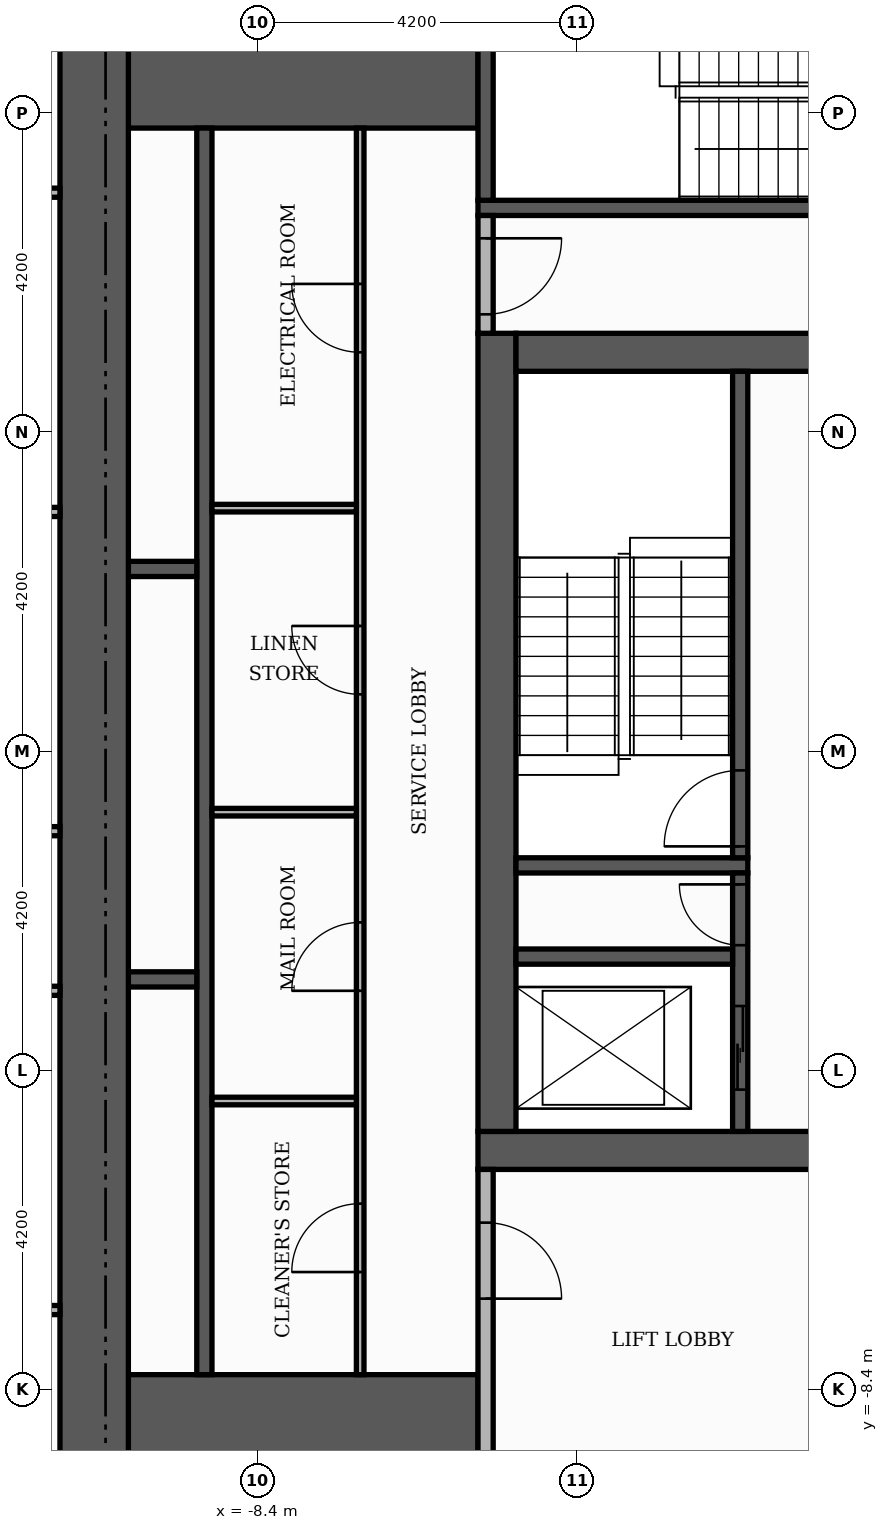
"""IFC4 building model, lengths in metres.
Left out: names, types, materials, properties, quantities, classifications, styles, units other than length and angle.
Written with IfcOpenShell. Run it as: python <this file> out.ifc"""

import sys

from ifc_helpers import new_model, si_unit, direction, frame, frame_2d, origin, place, context, subcontext, project, spatial, rectangle, extrude, element, fill, save


model = new_model("IFC4")
c1 = context("Model", 3, precision=1e-05, world=origin(), true_north=direction((0.0, 1.0)))
c2 = subcontext(c1, "Body", "Model", "MODEL_VIEW")
j1 = project(units=[si_unit("LENGTHUNIT", "METRE"), si_unit("PLANEANGLEUNIT", "RADIAN")], contexts=[c1])
p1 = place(None, origin())
s1 = spatial("IfcSite", under=j1, at=p1, CompositionType="ELEMENT")
p2 = place(p1, origin())
s2 = spatial("IfcBuilding", under=s1, at=p2, CompositionType="ELEMENT")
p3 = place(p2, frame((0.0, 0.0, 161.1)))
s3 = spatial("IfcBuildingStorey", under=s2, at=p3, CompositionType="ELEMENT", Elevation=161.1)
p4 = place(p3, frame((-5.5, -5.25, 0.0), z_axis=(0.0, 0.0, 1.0), x_axis=(1.0, 0.0, 0.0)))
e1 = element("IfcWall", 1, at=p4, inside=s3, PredefinedType="SHEAR", context=c2, shape_type="SweptSolid", body=[
    extrude(rectangle(XDim=11.0, YDim=0.5, at=frame_2d((5.5, 0.0))), origin(), (0.0, 0.0, 1.0), 3.48),
])
p5 = place(p4, frame((4.9, 0.0, 0.0)))
e2 = element("IfcOpeningElement", 2, at=p5, cuts=e1, PredefinedType="OPENING", context=c2, shape_type="SweptSolid", body=[
    extrude(rectangle(XDim=1.2, YDim=2.1, at=frame_2d((0.6, 1.05))), frame((0.0, 0.26, 0.0), z_axis=(0.0, -1.0, 0.0), x_axis=(1.0, 0.0, 0.0)), (0.0, 0.0, 1.0), 0.52),
])
p6 = place(p3, frame((-5.25, -5.0, 0.0), z_axis=(0.0, 0.0, 1.0), x_axis=(0.0, 1.0, 0.0)))
e3 = element("IfcWall", 3, at=p6, inside=s3, PredefinedType="SHEAR", context=c2, shape_type="SweptSolid", body=[
    extrude(rectangle(XDim=10.5, YDim=0.5, at=frame_2d((5.25, 0.0))), origin(), (0.0, 0.0, 1.0), 3.48),
])
p7 = place(p3, frame((-5.0, 5.25, 0.0), z_axis=(0.0, 0.0, 1.0), x_axis=(1.0, 0.0, 0.0)))
e4 = element("IfcWall", 4, at=p7, inside=s3, PredefinedType="SHEAR", context=c2, shape_type="SweptSolid", body=[
    extrude(rectangle(XDim=10.0, YDim=0.5, at=frame_2d((5.0, 0.0))), origin(), (0.0, 0.0, 1.0), 3.48),
])
p8 = place(p7, frame((4.4, 0.0, 0.0)))
e5 = element("IfcOpeningElement", 5, at=p8, cuts=e4, PredefinedType="OPENING", context=c2, shape_type="SweptSolid", body=[
    extrude(rectangle(XDim=1.2, YDim=2.1, at=frame_2d((0.6, 1.05))), frame((0.0, 0.26, 0.0), z_axis=(0.0, -1.0, 0.0), x_axis=(1.0, 0.0, 0.0)), (0.0, 0.0, 1.0), 0.52),
])
for number, where, z_axis, x_axis in (
    (6, (-10.1, -9.15, 0.0), (0.0, 0.0, 1.0), (1.0, 0.0, 0.0)),
    (7, (-10.1, 9.15, 0.0), (0.0, 0.0, 1.0), (1.0, 0.0, 0.0)),
):
    element("IfcWall", number, at=place(p3, frame(where, z_axis=z_axis, x_axis=x_axis)), inside=s3, PredefinedType="SHEAR", context=c2, shape_type="SweptSolid", body=[
        extrude(rectangle(XDim=4.6, YDim=1.9, at=frame_2d((2.3, 0.0))), origin(), (0.0, 0.0, 1.0), 3.48),
    ])
p9 = place(p3, frame((-5.0, -1.5, 0.0), z_axis=(0.0, 0.0, 1.0), x_axis=(1.0, 0.0, 0.0)))
e8 = element("IfcWall", 8, at=p9, inside=s3, PredefinedType="SHEAR", context=c2, shape_type="SweptSolid", body=[
    extrude(rectangle(XDim=3.05, YDim=0.2, at=frame_2d((1.525, 0.0))), origin(), (0.0, 0.0, 1.0), 3.48),
])
p10 = place(p3, frame((-2.05, -1.4, 0.0), z_axis=(0.0, 0.0, 1.0), x_axis=(0.0, 1.0, 0.0)))
e9 = element("IfcWall", 9, at=p10, inside=s3, PredefinedType="SHEAR", context=c2, shape_type="SweptSolid", body=[
    extrude(rectangle(XDim=6.4, YDim=0.2, at=frame_2d((3.2, 0.0))), origin(), (0.0, 0.0, 1.0), 3.48),
])
p11 = place(p10, frame((0.15, 0.0, 0.0)))
e10 = element("IfcOpeningElement", 10, at=p11, cuts=e9, PredefinedType="OPENING", context=c2, shape_type="SweptSolid", body=[
    extrude(rectangle(XDim=1.0, YDim=2.1, at=frame_2d((0.5, 1.05))), frame((0.0, 0.11, 0.0), z_axis=(0.0, -1.0, 0.0), x_axis=(1.0, 0.0, 0.0)), (0.0, 0.0, 1.0), 0.22),
])
p12 = place(p3, frame((-5.5, 7.15, 0.0), z_axis=(0.0, 0.0, 1.0), x_axis=(1.0, 0.0, 0.0)))
e11 = element("IfcWall", 11, at=p12, inside=s3, PredefinedType="SHEAR", context=c2, shape_type="SweptSolid", body=[
    extrude(rectangle(XDim=6.8, YDim=0.2, at=frame_2d((3.4, 0.0))), origin(), (0.0, 0.0, 1.0), 3.48),
])
p13 = place(p3, frame((-5.4, 7.25, 0.0), z_axis=(0.0, 0.0, 1.0), x_axis=(0.0, 1.0, 0.0)))
e12 = element("IfcWall", 12, at=p13, inside=s3, PredefinedType="SHEAR", context=c2, shape_type="SweptSolid", body=[
    extrude(rectangle(XDim=2.85, YDim=0.2, at=frame_2d((1.425, 0.0))), origin(), (0.0, 0.0, 1.0), 3.48),
])
p14 = place(p3, frame((-9.1, -8.2, 0.0), z_axis=(0.0, 0.0, 1.0), x_axis=(0.0, 1.0, 0.0)))
e13 = element("IfcWall", 13, at=p14, inside=s3, PredefinedType="SHEAR", context=c2, shape_type="SweptSolid", body=[
    extrude(rectangle(XDim=16.4, YDim=0.2, at=frame_2d((8.2, 0.0))), origin(), (0.0, 0.0, 1.0), 3.48),
])
p15 = place(p3, frame((-2.05, -5.0, 0.0), z_axis=(0.0, 0.0, 1.0), x_axis=(0.0, 1.0, 0.0)))
e14 = element("IfcWall", 14, at=p15, inside=s3, PredefinedType="SHEAR", context=c2, shape_type="SweptSolid", body=[
    extrude(rectangle(XDim=3.4, YDim=0.2, at=frame_2d((1.7, 0.0))), origin(), (0.0, 0.0, 1.0), 3.48),
])
p16 = place(p15, frame((0.55, 0.0, 0.0)))
e15 = element("IfcOpeningElement", 15, at=p16, cuts=e14, PredefinedType="OPENING", context=c2, shape_type="SweptSolid", body=[
    extrude(rectangle(XDim=1.1, YDim=2.1, at=frame_2d((0.55, 1.05))), frame((0.0, 0.11, 0.0), z_axis=(0.0, -1.0, 0.0), x_axis=(1.0, 0.0, 0.0)), (0.0, 0.0, 1.0), 0.22),
])
p17 = place(p15, frame((2.45, 0.0, 0.0)))
e16 = element("IfcOpeningElement", 16, at=p17, cuts=e14, PredefinedType="OPENING", context=c2, shape_type="SweptSolid", body=[
    extrude(rectangle(XDim=0.8, YDim=2.1, at=frame_2d((0.4, 1.05))), frame((0.0, 0.11, 0.0), z_axis=(0.0, -1.0, 0.0), x_axis=(1.0, 0.0, 0.0)), (0.0, 0.0, 1.0), 0.22),
])
p18 = place(p3, frame((-10.1, -3.0, 0.0), z_axis=(0.0, 0.0, 1.0), x_axis=(1.0, 0.0, 0.0)))
e17 = element("IfcWall", 17, at=p18, inside=s3, PredefinedType="SHEAR", context=c2, shape_type="SweptSolid", body=[
    extrude(rectangle(XDim=0.9, YDim=0.2, at=frame_2d((0.45, 0.0))), origin(), (0.0, 0.0, 1.0), 3.48),
])
p19 = place(p3, frame((-5.0, -2.7, 0.0), z_axis=(0.0, 0.0, 1.0), x_axis=(1.0, 0.0, 0.0)))
e18 = element("IfcWall", 18, at=p19, inside=s3, PredefinedType="SHEAR", context=c2, shape_type="SweptSolid", body=[
    extrude(rectangle(XDim=2.85, YDim=0.2, at=frame_2d((1.425, 0.0))), origin(), (0.0, 0.0, 1.0), 3.48),
])
p20 = place(p3, frame((-10.1, 2.4, 0.0), z_axis=(0.0, 0.0, 1.0), x_axis=(1.0, 0.0, 0.0)))
e19 = element("IfcWall", 19, at=p20, inside=s3, PredefinedType="SHEAR", context=c2, shape_type="SweptSolid", body=[
    extrude(rectangle(XDim=0.9, YDim=0.2, at=frame_2d((0.45, 0.0))), origin(), (0.0, 0.0, 1.0), 3.48),
])
p21 = place(p3, frame((-10.55, -10.1, 0.0), z_axis=(0.0, 0.0, 1.0), x_axis=(0.0, 1.0, 0.0)))
e20 = element("IfcWall", 20, at=p21, inside=s3, PredefinedType="SHEAR", context=c2, shape_type="SweptSolid", body=[
    extrude(rectangle(XDim=20.2, YDim=0.9, at=frame_2d((10.1, 0.0))), origin(), (0.0, 0.0, 1.0), 3.48),
])
p22 = place(p3, frame((-5.4, -10.1, 0.0), z_axis=(0.0, 0.0, 1.0), x_axis=(0.0, 1.0, 0.0)))
e21 = element("IfcWall", 21, at=p22, inside=s3, PredefinedType="PARTITIONING", context=c2, shape_type="SweptSolid", body=[
    extrude(rectangle(XDim=4.6, YDim=0.2, at=frame_2d((2.3, 0.0))), origin(), (0.0, 0.0, 1.0), 3.48),
])
p23 = place(p22, frame((2.9, 0.0, 0.0)))
e22 = element("IfcOpeningElement", 22, at=p23, cuts=e21, PredefinedType="OPENING", context=c2, shape_type="SweptSolid", body=[
    extrude(rectangle(XDim=1.0, YDim=2.1, at=frame_2d((0.5, 1.05))), frame((0.0, 0.11, 0.0), z_axis=(0.0, -1.0, 0.0), x_axis=(1.0, 0.0, 0.0)), (0.0, 0.0, 1.0), 0.22),
])
p24 = place(p3, frame((-7.05, -8.2, 0.0), z_axis=(0.0, 0.0, 1.0), x_axis=(0.0, 1.0, 0.0)))
e23 = element("IfcWall", 23, at=p24, inside=s3, PredefinedType="PARTITIONING", context=c2, shape_type="SweptSolid", body=[
    extrude(rectangle(XDim=16.4, YDim=0.1, at=frame_2d((8.2, 0.0))), origin(), (0.0, 0.0, 1.0), 3.48),
])
p25 = place(p24, frame((1.35, 0.0, 0.0)))
e24 = element("IfcOpeningElement", 24, at=p25, cuts=e23, PredefinedType="OPENING", context=c2, shape_type="SweptSolid", body=[
    extrude(rectangle(XDim=0.9, YDim=2.1, at=frame_2d((0.45, 1.05))), frame((0.0, 0.06, 0.0), z_axis=(0.0, -1.0, 0.0), x_axis=(1.0, 0.0, 0.0)), (0.0, 0.0, 1.0), 0.12),
])
p26 = place(p24, frame((5.05, 0.0, 0.0)))
e25 = element("IfcOpeningElement", 25, at=p26, cuts=e23, PredefinedType="OPENING", context=c2, shape_type="SweptSolid", body=[
    extrude(rectangle(XDim=0.9, YDim=2.1, at=frame_2d((0.45, 1.05))), frame((0.0, 0.06, 0.0), z_axis=(0.0, -1.0, 0.0), x_axis=(1.0, 0.0, 0.0)), (0.0, 0.0, 1.0), 0.12),
])
p27 = place(p24, frame((8.95, 0.0, 0.0)))
e26 = element("IfcOpeningElement", 26, at=p27, cuts=e23, PredefinedType="OPENING", context=c2, shape_type="SweptSolid", body=[
    extrude(rectangle(XDim=0.9, YDim=2.1, at=frame_2d((0.45, 1.05))), frame((0.0, 0.06, 0.0), z_axis=(0.0, -1.0, 0.0), x_axis=(1.0, 0.0, 0.0)), (0.0, 0.0, 1.0), 0.12),
])
p28 = place(p24, frame((13.45, 0.0, 0.0)))
e27 = element("IfcOpeningElement", 27, at=p28, cuts=e23, PredefinedType="OPENING", context=c2, shape_type="SweptSolid", body=[
    extrude(rectangle(XDim=0.9, YDim=2.1, at=frame_2d((0.45, 1.05))), frame((0.0, 0.06, 0.0), z_axis=(0.0, -1.0, 0.0), x_axis=(1.0, 0.0, 0.0)), (0.0, 0.0, 1.0), 0.12),
])
for number, where, z_axis, x_axis in (
    (28, (-9.0, -4.6, 0.0), (0.0, 0.0, 1.0), (1.0, 0.0, 0.0)),
    (29, (-9.0, -0.8, 0.0), (0.0, 0.0, 1.0), (1.0, 0.0, 0.0)),
    (30, (-9.0, 3.2, 0.0), (0.0, 0.0, 1.0), (1.0, 0.0, 0.0)),
):
    element("IfcWall", number, at=place(p3, frame(where, z_axis=z_axis, x_axis=x_axis)), inside=s3, PredefinedType="PARTITIONING", context=c2, shape_type="SweptSolid", body=[
        extrude(rectangle(XDim=1.9, YDim=0.1, at=frame_2d((0.95, 0.0))), origin(), (0.0, 0.0, 1.0), 3.48),
    ])
p29 = place(p3, frame((-5.4, 5.5, 0.0), z_axis=(0.0, 0.0, 1.0), x_axis=(0.0, 1.0, 0.0)))
e31 = element("IfcWall", 31, at=p29, inside=s3, PredefinedType="PARTITIONING", context=c2, shape_type="SweptSolid", body=[
    extrude(rectangle(XDim=1.55, YDim=0.2, at=frame_2d((0.775, 0.0))), origin(), (0.0, 0.0, 1.0), 3.48),
])
p30 = place(p29, frame((0.25, 0.0, 0.0)))
e32 = element("IfcOpeningElement", 32, at=p30, cuts=e31, PredefinedType="OPENING", context=c2, shape_type="SweptSolid", body=[
    extrude(rectangle(XDim=1.0, YDim=2.1, at=frame_2d((0.5, 1.05))), frame((0.0, 0.11, 0.0), z_axis=(0.0, -1.0, 0.0), x_axis=(1.0, 0.0, 0.0)), (0.0, 0.0, 1.0), 0.22),
])
for number, where, z_axis, x_axis in (
    (33, (-18.32, -7.35, 0.0), (0.0, 0.0, 1.0), (1.0, 0.0, 0.0)),
    (34, (-18.32, -3.15, 0.0), (0.0, 0.0, 1.0), (1.0, 0.0, 0.0)),
    (35, (-18.32, -1.05, 0.0), (0.0, 0.0, 1.0), (1.0, 0.0, 0.0)),
    (36, (-18.32, 3.15, 0.0), (0.0, 0.0, 1.0), (1.0, 0.0, 0.0)),
):
    element("IfcWall", number, at=place(p3, frame(where, z_axis=z_axis, x_axis=x_axis)), inside=s3, PredefinedType="PARTITIONING", context=c2, shape_type="SweptSolid", body=[
        extrude(rectangle(XDim=7.32, YDim=0.12, at=frame_2d((3.66, 0.0))), origin(), (0.0, 0.0, 1.0), 3.48),
    ])
p31 = place(p3, frame((-18.32, 7.35, 0.0), z_axis=(0.0, 0.0, 1.0), x_axis=(1.0, 0.0, 0.0)))
e37 = element("IfcWall", 37, at=p31, inside=s3, PredefinedType="PARTITIONING", context=c2, shape_type="SweptSolid", body=[
    extrude(rectangle(XDim=7.32, YDim=0.12, at=frame_2d((3.66, 0.0))), origin(), (0.0, 0.0, 1.0), 3.48),
])
p32 = place(p31, frame((3.21, 0.0, 0.0)))
e38 = element("IfcOpeningElement", 38, at=p32, cuts=e37, PredefinedType="OPENING", context=c2, shape_type="SweptSolid", body=[
    extrude(rectangle(XDim=0.9, YDim=2.1, at=frame_2d((0.45, 1.05))), frame((0.0, 0.07, 0.0), z_axis=(0.0, -1.0, 0.0), x_axis=(1.0, 0.0, 0.0)), (0.0, 0.0, 1.0), 0.14),
])
p33 = place(p16, origin())
e39 = element("IfcDoor", 39, at=p33, inside=s3, OperationType="SLIDING_TO_LEFT", PredefinedType="DOOR", context=c2, shape_type="SweptSolid", body=[
    extrude(rectangle(XDim=1.1, YDim=2.1, at=frame_2d((0.55, 1.05))), frame((0.0, 0.025, 0.0), z_axis=(0.0, -1.0, 0.0), x_axis=(1.0, 0.0, 0.0)), (0.0, 0.0, 1.0), 0.05),
])
fill(e15, e39)
p34 = place(p11, origin())
e40 = element("IfcDoor", 40, at=p34, inside=s3, OperationType="SINGLE_SWING_LEFT", PredefinedType="DOOR", context=c2, shape_type="SweptSolid", body=[
    extrude(rectangle(XDim=1.0, YDim=2.1, at=frame_2d((0.5, 1.05))), frame((0.0, 0.025, 0.0), z_axis=(0.0, -1.0, 0.0), x_axis=(1.0, 0.0, 0.0)), (0.0, 0.0, 1.0), 0.05),
])
fill(e10, e40)
p35 = place(p17, origin())
e41 = element("IfcDoor", 41, at=p35, inside=s3, OperationType="SINGLE_SWING_RIGHT", PredefinedType="DOOR", context=c2, shape_type="SweptSolid", body=[
    extrude(rectangle(XDim=0.8, YDim=2.1, at=frame_2d((0.4, 1.05))), frame((0.0, 0.025, 0.0), z_axis=(0.0, -1.0, 0.0), x_axis=(1.0, 0.0, 0.0)), (0.0, 0.0, 1.0), 0.05),
])
fill(e16, e41)
p36 = place(p30, frame((1.0, 0.0, 0.0), z_axis=(0.0, 0.0, 1.0), x_axis=(-1.0, 0.0, 0.0)))
e42 = element("IfcDoor", 42, at=p36, inside=s3, OperationType="SINGLE_SWING_RIGHT", PredefinedType="DOOR", context=c2, shape_type="SweptSolid", body=[
    extrude(rectangle(XDim=1.0, YDim=2.1, at=frame_2d((0.5, 1.05))), frame((0.0, 0.025, 0.0), z_axis=(0.0, -1.0, 0.0), x_axis=(1.0, 0.0, 0.0)), (0.0, 0.0, 1.0), 0.05),
])
fill(e32, e42)
p37 = place(p23, frame((1.0, 0.0, 0.0), z_axis=(0.0, 0.0, 1.0), x_axis=(-1.0, 0.0, 0.0)))
e43 = element("IfcDoor", 43, at=p37, inside=s3, OperationType="SINGLE_SWING_LEFT", PredefinedType="DOOR", context=c2, shape_type="SweptSolid", body=[
    extrude(rectangle(XDim=1.0, YDim=2.1, at=frame_2d((0.5, 1.05))), frame((0.0, 0.025, 0.0), z_axis=(0.0, -1.0, 0.0), x_axis=(1.0, 0.0, 0.0)), (0.0, 0.0, 1.0), 0.05),
])
fill(e22, e43)
p38 = place(p25, origin())
e44 = element("IfcDoor", 44, at=p38, inside=s3, OperationType="SINGLE_SWING_LEFT", PredefinedType="DOOR", context=c2, shape_type="SweptSolid", body=[
    extrude(rectangle(XDim=0.9, YDim=2.1, at=frame_2d((0.45, 1.05))), frame((0.0, 0.025, 0.0), z_axis=(0.0, -1.0, 0.0), x_axis=(1.0, 0.0, 0.0)), (0.0, 0.0, 1.0), 0.05),
])
fill(e24, e44)
p39 = place(p26, origin())
e45 = element("IfcDoor", 45, at=p39, inside=s3, OperationType="SINGLE_SWING_LEFT", PredefinedType="DOOR", context=c2, shape_type="SweptSolid", body=[
    extrude(rectangle(XDim=0.9, YDim=2.1, at=frame_2d((0.45, 1.05))), frame((0.0, 0.025, 0.0), z_axis=(0.0, -1.0, 0.0), x_axis=(1.0, 0.0, 0.0)), (0.0, 0.0, 1.0), 0.05),
])
fill(e25, e45)
p40 = place(p27, origin())
e46 = element("IfcDoor", 46, at=p40, inside=s3, OperationType="SINGLE_SWING_RIGHT", PredefinedType="DOOR", context=c2, shape_type="SweptSolid", body=[
    extrude(rectangle(XDim=0.9, YDim=2.1, at=frame_2d((0.45, 1.05))), frame((0.0, 0.025, 0.0), z_axis=(0.0, -1.0, 0.0), x_axis=(1.0, 0.0, 0.0)), (0.0, 0.0, 1.0), 0.05),
])
fill(e26, e46)
p41 = place(p28, origin())
e47 = element("IfcDoor", 47, at=p41, inside=s3, OperationType="SINGLE_SWING_RIGHT", PredefinedType="DOOR", context=c2, shape_type="SweptSolid", body=[
    extrude(rectangle(XDim=0.9, YDim=2.1, at=frame_2d((0.45, 1.05))), frame((0.0, 0.025, 0.0), z_axis=(0.0, -1.0, 0.0), x_axis=(1.0, 0.0, 0.0)), (0.0, 0.0, 1.0), 0.05),
])
fill(e27, e47)
save(model, sys.argv[1])
